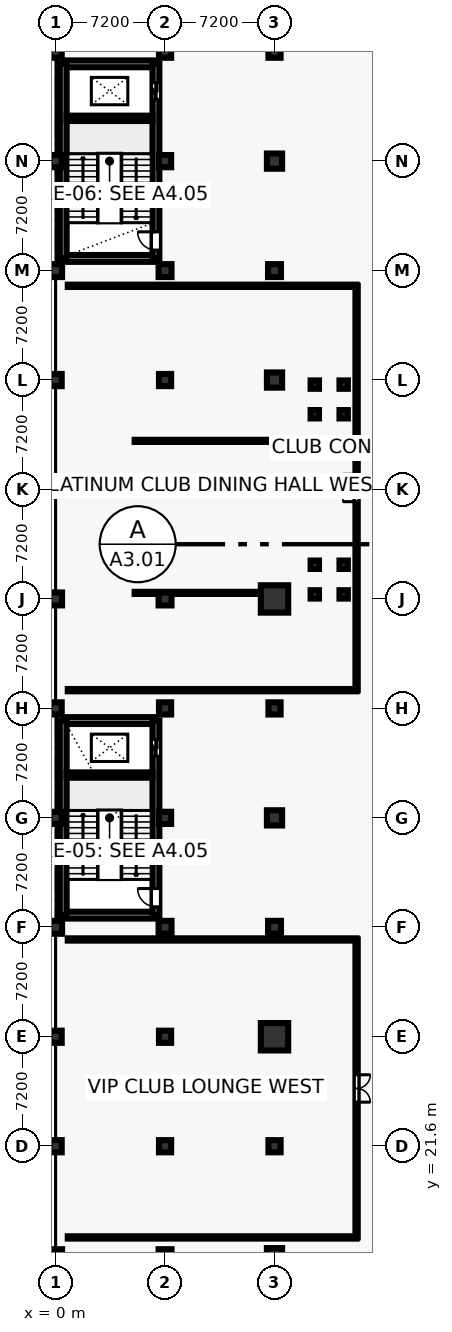
"""IFC4 building model, lengths in metres.
Left out: names, types, materials, properties, quantities, classifications, styles, units other than length and angle.
Written with IfcOpenShell. Run it as: python <this file> out.ifc"""

import sys

from ifc_helpers import new_model, si_unit, direction, frame, frame_2d, origin, origin_2d, place, context, subcontext, project, spatial, rectangle, circle, extrude, element, fill, save


model = new_model("IFC4")
c1 = context("Model", 3, precision=1e-05, world=origin(), true_north=direction((0.0, 1.0)))
c2 = subcontext(c1, "Body", "Model", "MODEL_VIEW")
j1 = project(units=[si_unit("LENGTHUNIT", "METRE"), si_unit("PLANEANGLEUNIT", "RADIAN")], contexts=[c1])
p1 = place(None, origin())
s1 = spatial("IfcSite", under=j1, at=p1, CompositionType="ELEMENT")
p2 = place(p1, origin())
s2 = spatial("IfcBuilding", under=s1, at=p2, CompositionType="ELEMENT")
p3 = place(p2, frame((0.0, 0.0, 5.4)))
s3 = spatial("IfcBuildingStorey", under=s2, at=p3, CompositionType="ELEMENT", Elevation=5.4)
p4 = place(p3, frame((0.0, 14.4, 0.0), z_axis=(0.0, 0.0, 1.0), x_axis=(1.0, 0.0, 0.0)))
e1 = element("IfcColumn", 1, at=p4, inside=s3, PredefinedType="COLUMN", context=c2, shape_type="SweptSolid", body=[
    extrude(rectangle(XDim=0.85, YDim=0.85, at=origin_2d()), origin(), (0.0, 0.0, 1.0), 4.2),
])
p5 = place(p3, frame((0.0, 21.6, 0.0), z_axis=(0.0, 0.0, 1.0), x_axis=(1.0, 0.0, 0.0)))
e2 = element("IfcColumn", 2, at=p5, inside=s3, PredefinedType="COLUMN", context=c2, shape_type="SweptSolid", body=[
    extrude(rectangle(XDim=0.8, YDim=0.8, at=origin_2d()), origin(), (0.0, 0.0, 1.0), 4.2),
])
p6 = place(p3, frame((0.0, 28.8, 0.0), z_axis=(0.0, 0.0, 1.0), x_axis=(1.0, 0.0, 0.0)))
e3 = element("IfcColumn", 3, at=p6, inside=s3, PredefinedType="COLUMN", context=c2, shape_type="SweptSolid", body=[
    extrude(circle(Radius=0.4, at=origin_2d()), origin(), (0.0, 0.0, 1.0), 4.2),
])
p7 = place(p3, frame((0.0, 36.0, 0.0), z_axis=(0.0, 0.0, 1.0), x_axis=(1.0, 0.0, 0.0)))
e4 = element("IfcColumn", 4, at=p7, inside=s3, PredefinedType="COLUMN", context=c2, shape_type="SweptSolid", body=[
    extrude(rectangle(XDim=0.85, YDim=0.85, at=origin_2d()), origin(), (0.0, 0.0, 1.0), 4.2),
])
p8 = place(p3, frame((0.0, 43.2, 0.0), z_axis=(0.0, 0.0, 1.0), x_axis=(1.0, 0.0, 0.0)))
e5 = element("IfcColumn", 5, at=p8, inside=s3, PredefinedType="COLUMN", context=c2, shape_type="SweptSolid", body=[
    extrude(rectangle(XDim=0.8, YDim=0.8, at=origin_2d()), origin(), (0.0, 0.0, 1.0), 4.2),
])
p9 = place(p3, frame((0.0, 50.4, 0.0), z_axis=(0.0, 0.0, 1.0), x_axis=(1.0, 0.0, 0.0)))
e6 = element("IfcColumn", 6, at=p9, inside=s3, PredefinedType="COLUMN", context=c2, shape_type="SweptSolid", body=[
    extrude(circle(Radius=0.4, at=origin_2d()), origin(), (0.0, 0.0, 1.0), 4.2),
])
p10 = place(p3, frame((0.0, 57.6, 0.0), z_axis=(0.0, 0.0, 1.0), x_axis=(1.0, 0.0, 0.0)))
e7 = element("IfcColumn", 7, at=p10, inside=s3, PredefinedType="COLUMN", context=c2, shape_type="SweptSolid", body=[
    extrude(rectangle(XDim=0.85, YDim=0.85, at=origin_2d()), origin(), (0.0, 0.0, 1.0), 4.2),
])
p11 = place(p3, frame((0.0, 64.8, 0.0), z_axis=(0.0, 0.0, 1.0), x_axis=(1.0, 0.0, 0.0)))
e8 = element("IfcColumn", 8, at=p11, inside=s3, PredefinedType="COLUMN", context=c2, shape_type="SweptSolid", body=[
    extrude(rectangle(XDim=0.8, YDim=0.8, at=origin_2d()), origin(), (0.0, 0.0, 1.0), 4.2),
])
p12 = place(p3, frame((0.0, 72.0, 0.0), z_axis=(0.0, 0.0, 1.0), x_axis=(1.0, 0.0, 0.0)))
e9 = element("IfcColumn", 9, at=p12, inside=s3, PredefinedType="COLUMN", context=c2, shape_type="SweptSolid", body=[
    extrude(circle(Radius=0.4, at=origin_2d()), origin(), (0.0, 0.0, 1.0), 4.2),
])
p13 = place(p3, frame((0.0, 79.2, 0.0), z_axis=(0.0, 0.0, 1.0), x_axis=(1.0, 0.0, 0.0)))
e10 = element("IfcColumn", 10, at=p13, inside=s3, PredefinedType="COLUMN", context=c2, shape_type="SweptSolid", body=[
    extrude(rectangle(XDim=0.85, YDim=0.85, at=origin_2d()), origin(), (0.0, 0.0, 1.0), 4.2),
])
p14 = place(p3, frame((0.0, 86.4, 0.0), z_axis=(0.0, 0.0, 1.0), x_axis=(1.0, 0.0, 0.0)))
e11 = element("IfcColumn", 11, at=p14, inside=s3, PredefinedType="COLUMN", context=c2, shape_type="SweptSolid", body=[
    extrude(rectangle(XDim=0.8, YDim=0.8, at=origin_2d()), origin(), (0.0, 0.0, 1.0), 4.2),
])
p15 = place(p3, frame((0.0, 93.6, 0.0), z_axis=(0.0, 0.0, 1.0), x_axis=(1.0, 0.0, 0.0)))
e12 = element("IfcColumn", 12, at=p15, inside=s3, PredefinedType="COLUMN", context=c2, shape_type="SweptSolid", body=[
    extrude(circle(Radius=0.4, at=origin_2d()), origin(), (0.0, 0.0, 1.0), 4.2),
])
p16 = place(p3, frame((7.2, 14.4, 0.0), z_axis=(0.0, 0.0, 1.0), x_axis=(1.0, 0.0, 0.0)))
e13 = element("IfcColumn", 13, at=p16, inside=s3, PredefinedType="COLUMN", context=c2, shape_type="SweptSolid", body=[
    extrude(rectangle(XDim=0.85, YDim=0.85, at=origin_2d()), origin(), (0.0, 0.0, 1.0), 4.2),
])
p17 = place(p3, frame((7.2, 21.6, 0.0), z_axis=(0.0, 0.0, 1.0), x_axis=(1.0, 0.0, 0.0)))
e14 = element("IfcColumn", 14, at=p17, inside=s3, PredefinedType="COLUMN", context=c2, shape_type="SweptSolid", body=[
    extrude(rectangle(XDim=0.8, YDim=0.8, at=origin_2d()), origin(), (0.0, 0.0, 1.0), 4.2),
])
p18 = place(p3, frame((7.2, 28.8, 0.0), z_axis=(0.0, 0.0, 1.0), x_axis=(1.0, 0.0, 0.0)))
e15 = element("IfcColumn", 15, at=p18, inside=s3, PredefinedType="COLUMN", context=c2, shape_type="SweptSolid", body=[
    extrude(circle(Radius=0.4, at=origin_2d()), origin(), (0.0, 0.0, 1.0), 4.2),
])
p19 = place(p3, frame((7.2, 36.0, 0.0), z_axis=(0.0, 0.0, 1.0), x_axis=(1.0, 0.0, 0.0)))
e16 = element("IfcColumn", 16, at=p19, inside=s3, PredefinedType="COLUMN", context=c2, shape_type="SweptSolid", body=[
    extrude(rectangle(XDim=0.85, YDim=0.85, at=origin_2d()), origin(), (0.0, 0.0, 1.0), 4.2),
])
p20 = place(p3, frame((7.2, 43.2, 0.0), z_axis=(0.0, 0.0, 1.0), x_axis=(1.0, 0.0, 0.0)))
e17 = element("IfcColumn", 17, at=p20, inside=s3, PredefinedType="COLUMN", context=c2, shape_type="SweptSolid", body=[
    extrude(rectangle(XDim=0.8, YDim=0.8, at=origin_2d()), origin(), (0.0, 0.0, 1.0), 4.2),
])
p21 = place(p3, frame((7.2, 50.4, 0.0), z_axis=(0.0, 0.0, 1.0), x_axis=(1.0, 0.0, 0.0)))
e18 = element("IfcColumn", 18, at=p21, inside=s3, PredefinedType="COLUMN", context=c2, shape_type="SweptSolid", body=[
    extrude(circle(Radius=0.4, at=origin_2d()), origin(), (0.0, 0.0, 1.0), 4.2),
])
p22 = place(p3, frame((7.2, 57.6, 0.0), z_axis=(0.0, 0.0, 1.0), x_axis=(1.0, 0.0, 0.0)))
e19 = element("IfcColumn", 19, at=p22, inside=s3, PredefinedType="COLUMN", context=c2, shape_type="SweptSolid", body=[
    extrude(rectangle(XDim=0.85, YDim=0.85, at=origin_2d()), origin(), (0.0, 0.0, 1.0), 4.2),
])
p23 = place(p3, frame((7.2, 64.8, 0.0), z_axis=(0.0, 0.0, 1.0), x_axis=(1.0, 0.0, 0.0)))
e20 = element("IfcColumn", 20, at=p23, inside=s3, PredefinedType="COLUMN", context=c2, shape_type="SweptSolid", body=[
    extrude(rectangle(XDim=0.8, YDim=0.8, at=origin_2d()), origin(), (0.0, 0.0, 1.0), 4.2),
])
p24 = place(p3, frame((7.2, 72.0, 0.0), z_axis=(0.0, 0.0, 1.0), x_axis=(1.0, 0.0, 0.0)))
e21 = element("IfcColumn", 21, at=p24, inside=s3, PredefinedType="COLUMN", context=c2, shape_type="SweptSolid", body=[
    extrude(circle(Radius=0.4, at=origin_2d()), origin(), (0.0, 0.0, 1.0), 4.2),
])
p25 = place(p3, frame((7.2, 79.2, 0.0), z_axis=(0.0, 0.0, 1.0), x_axis=(1.0, 0.0, 0.0)))
e22 = element("IfcColumn", 22, at=p25, inside=s3, PredefinedType="COLUMN", context=c2, shape_type="SweptSolid", body=[
    extrude(rectangle(XDim=0.85, YDim=0.85, at=origin_2d()), origin(), (0.0, 0.0, 1.0), 4.2),
])
p26 = place(p3, frame((7.2, 86.4, 0.0), z_axis=(0.0, 0.0, 1.0), x_axis=(1.0, 0.0, 0.0)))
e23 = element("IfcColumn", 23, at=p26, inside=s3, PredefinedType="COLUMN", context=c2, shape_type="SweptSolid", body=[
    extrude(rectangle(XDim=0.8, YDim=0.8, at=origin_2d()), origin(), (0.0, 0.0, 1.0), 4.2),
])
p27 = place(p3, frame((7.2, 93.6, 0.0), z_axis=(0.0, 0.0, 1.0), x_axis=(1.0, 0.0, 0.0)))
e24 = element("IfcColumn", 24, at=p27, inside=s3, PredefinedType="COLUMN", context=c2, shape_type="SweptSolid", body=[
    extrude(circle(Radius=0.4, at=origin_2d()), origin(), (0.0, 0.0, 1.0), 4.2),
])
p28 = place(p3, frame((14.4, 14.4, 0.0), z_axis=(0.0, 0.0, 1.0), x_axis=(1.0, 0.0, 0.0)))
e25 = element("IfcColumn", 25, at=p28, inside=s3, PredefinedType="COLUMN", context=c2, shape_type="SweptSolid", body=[
    extrude(circle(Radius=0.5, at=origin_2d()), origin(), (0.0, 0.0, 1.0), 4.2),
])
p29 = place(p3, frame((14.4, 21.6, 0.0), z_axis=(0.0, 0.0, 1.0), x_axis=(1.0, 0.0, 0.0)))
e26 = element("IfcColumn", 26, at=p29, inside=s3, PredefinedType="COLUMN", context=c2, shape_type="SweptSolid", body=[
    extrude(rectangle(XDim=0.8, YDim=0.8, at=origin_2d()), origin(), (0.0, 0.0, 1.0), 4.2),
])
p30 = place(p3, frame((14.4, 28.8, 0.0), z_axis=(0.0, 0.0, 1.0), x_axis=(1.0, 0.0, 0.0)))
e27 = element("IfcColumn", 27, at=p30, inside=s3, PredefinedType="COLUMN", context=c2, shape_type="SweptSolid", body=[
    extrude(circle(Radius=0.9, at=origin_2d()), origin(), (0.0, 0.0, 1.0), 4.2),
])
p31 = place(p3, frame((14.4, 36.0, 0.0), z_axis=(0.0, 0.0, 1.0), x_axis=(1.0, 0.0, 0.0)))
e28 = element("IfcColumn", 28, at=p31, inside=s3, PredefinedType="COLUMN", context=c2, shape_type="SweptSolid", body=[
    extrude(rectangle(XDim=0.85, YDim=0.85, at=origin_2d()), origin(), (0.0, 0.0, 1.0), 4.2),
])
p32 = place(p3, frame((14.4, 43.2, 0.0), z_axis=(0.0, 0.0, 1.0), x_axis=(1.0, 0.0, 0.0)))
e29 = element("IfcColumn", 29, at=p32, inside=s3, PredefinedType="COLUMN", context=c2, shape_type="SweptSolid", body=[
    extrude(circle(Radius=0.5, at=origin_2d()), origin(), (0.0, 0.0, 1.0), 4.2),
])
p33 = place(p3, frame((14.4, 50.4, 0.0), z_axis=(0.0, 0.0, 1.0), x_axis=(1.0, 0.0, 0.0)))
e30 = element("IfcColumn", 30, at=p33, inside=s3, PredefinedType="COLUMN", context=c2, shape_type="SweptSolid", body=[
    extrude(circle(Radius=0.4, at=origin_2d()), origin(), (0.0, 0.0, 1.0), 4.2),
])
p34 = place(p3, frame((14.4, 57.6, 0.0), z_axis=(0.0, 0.0, 1.0), x_axis=(1.0, 0.0, 0.0)))
e31 = element("IfcColumn", 31, at=p34, inside=s3, PredefinedType="COLUMN", context=c2, shape_type="SweptSolid", body=[
    extrude(circle(Radius=0.9, at=origin_2d()), origin(), (0.0, 0.0, 1.0), 4.2),
])
p35 = place(p3, frame((14.4, 64.8, 0.0), z_axis=(0.0, 0.0, 1.0), x_axis=(1.0, 0.0, 0.0)))
e32 = element("IfcColumn", 32, at=p35, inside=s3, PredefinedType="COLUMN", context=c2, shape_type="SweptSolid", body=[
    extrude(rectangle(XDim=0.8, YDim=0.8, at=origin_2d()), origin(), (0.0, 0.0, 1.0), 4.2),
])
p36 = place(p3, frame((14.4, 72.0, 0.0), z_axis=(0.0, 0.0, 1.0), x_axis=(1.0, 0.0, 0.0)))
e33 = element("IfcColumn", 33, at=p36, inside=s3, PredefinedType="COLUMN", context=c2, shape_type="SweptSolid", body=[
    extrude(circle(Radius=0.5, at=origin_2d()), origin(), (0.0, 0.0, 1.0), 4.2),
])
p37 = place(p3, frame((14.4, 79.2, 0.0), z_axis=(0.0, 0.0, 1.0), x_axis=(1.0, 0.0, 0.0)))
e34 = element("IfcColumn", 34, at=p37, inside=s3, PredefinedType="COLUMN", context=c2, shape_type="SweptSolid", body=[
    extrude(rectangle(XDim=0.85, YDim=0.85, at=origin_2d()), origin(), (0.0, 0.0, 1.0), 4.2),
])
p38 = place(p3, frame((14.4, 86.4, 0.0), z_axis=(0.0, 0.0, 1.0), x_axis=(1.0, 0.0, 0.0)))
e35 = element("IfcColumn", 35, at=p38, inside=s3, PredefinedType="COLUMN", context=c2, shape_type="SweptSolid", body=[
    extrude(circle(Radius=0.5, at=origin_2d()), origin(), (0.0, 0.0, 1.0), 4.2),
])
p39 = place(p3, frame((14.4, 93.6, 0.0), z_axis=(0.0, 0.0, 1.0), x_axis=(1.0, 0.0, 0.0)))
e36 = element("IfcColumn", 36, at=p39, inside=s3, PredefinedType="COLUMN", context=c2, shape_type="SweptSolid", body=[
    extrude(circle(Radius=0.4, at=origin_2d()), origin(), (0.0, 0.0, 1.0), 4.2),
])
for number, where, z_axis, x_axis in (
    (37, (0.5, 36.8, 0.0), (0.0, 0.0, 1.0), (1.0, 0.0, 0.0)),
    (38, (0.5, 49.6, 0.0), (0.0, 0.0, 1.0), (1.0, 0.0, 0.0)),
):
    element("IfcWall", number, at=place(p3, frame(where, z_axis=z_axis, x_axis=x_axis)), inside=s3, PredefinedType="SHEAR", context=c2, shape_type="SweptSolid", body=[
        extrude(rectangle(XDim=6.1, YDim=0.45, at=frame_2d((3.05, 0.0))), origin(), (0.0, 0.0, 1.0), 3.92),
    ])
p40 = place(p3, frame((0.5, 36.8, 0.0), z_axis=(0.0, 0.0, 1.0), x_axis=(0.0, 1.0, 0.0)))
e39 = element("IfcWall", 39, at=p40, inside=s3, PredefinedType="SHEAR", context=c2, shape_type="SweptSolid", body=[
    extrude(rectangle(XDim=12.8, YDim=0.45, at=frame_2d((6.4, 0.0))), origin(), (0.0, 0.0, 1.0), 3.92),
])
p41 = place(p3, frame((6.6, 36.8, 0.0), z_axis=(0.0, 0.0, 1.0), x_axis=(0.0, 1.0, 0.0)))
e40 = element("IfcWall", 40, at=p41, inside=s3, PredefinedType="SHEAR", context=c2, shape_type="SweptSolid", body=[
    extrude(rectangle(XDim=12.8, YDim=0.45, at=frame_2d((6.4, 0.0))), origin(), (0.0, 0.0, 1.0), 3.92),
])
p42 = place(p41, frame((0.55, 0.0, 0.0)))
e41 = element("IfcOpeningElement", 41, at=p42, cuts=e40, PredefinedType="OPENING", context=c2, shape_type="SweptSolid", body=[
    extrude(rectangle(XDim=1.2, YDim=2.25, at=frame_2d((0.6, 1.125))), frame((0.0, 0.235, 0.0), z_axis=(0.0, -1.0, 0.0), x_axis=(1.0, 0.0, 0.0)), (0.0, 0.0, 1.0), 0.47),
])
p43 = place(p41, frame((10.458, 0.0, 0.0)))
e42 = element("IfcOpeningElement", 42, at=p43, cuts=e40, PredefinedType="OPENING", context=c2, shape_type="SweptSolid", body=[
    extrude(rectangle(XDim=1.1, YDim=2.2, at=frame_2d((0.55, 1.1))), frame((0.0, 0.235, 0.0), z_axis=(0.0, -1.0, 0.0), x_axis=(1.0, 0.0, 0.0)), (0.0, 0.0, 1.0), 0.47),
])
p44 = place(p3, frame((0.725, 46.016, 0.0), z_axis=(0.0, 0.0, 1.0), x_axis=(1.0, 0.0, 0.0)))
e43 = element("IfcWall", 43, at=p44, inside=s3, PredefinedType="SHEAR", context=c2, shape_type="SweptSolid", body=[
    extrude(rectangle(XDim=5.65, YDim=0.35, at=frame_2d((2.825, 0.0))), origin(), (0.0, 0.0, 1.0), 3.92),
])
for number, where, z_axis, x_axis in (
    (44, (0.5, 80.0, 0.0), (0.0, 0.0, 1.0), (1.0, 0.0, 0.0)),
    (45, (0.5, 92.8, 0.0), (0.0, 0.0, 1.0), (1.0, 0.0, 0.0)),
):
    element("IfcWall", number, at=place(p3, frame(where, z_axis=z_axis, x_axis=x_axis)), inside=s3, PredefinedType="SHEAR", context=c2, shape_type="SweptSolid", body=[
        extrude(rectangle(XDim=6.1, YDim=0.45, at=frame_2d((3.05, 0.0))), origin(), (0.0, 0.0, 1.0), 3.92),
    ])
p45 = place(p3, frame((0.5, 80.0, 0.0), z_axis=(0.0, 0.0, 1.0), x_axis=(0.0, 1.0, 0.0)))
e46 = element("IfcWall", 46, at=p45, inside=s3, PredefinedType="SHEAR", context=c2, shape_type="SweptSolid", body=[
    extrude(rectangle(XDim=12.8, YDim=0.45, at=frame_2d((6.4, 0.0))), origin(), (0.0, 0.0, 1.0), 3.92),
])
p46 = place(p3, frame((6.6, 80.0, 0.0), z_axis=(0.0, 0.0, 1.0), x_axis=(0.0, 1.0, 0.0)))
e47 = element("IfcWall", 47, at=p46, inside=s3, PredefinedType="SHEAR", context=c2, shape_type="SweptSolid", body=[
    extrude(rectangle(XDim=12.8, YDim=0.45, at=frame_2d((6.4, 0.0))), origin(), (0.0, 0.0, 1.0), 3.92),
])
p47 = place(p46, frame((0.55, 0.0, 0.0)))
e48 = element("IfcOpeningElement", 48, at=p47, cuts=e47, PredefinedType="OPENING", context=c2, shape_type="SweptSolid", body=[
    extrude(rectangle(XDim=1.2, YDim=2.25, at=frame_2d((0.6, 1.125))), frame((0.0, 0.235, 0.0), z_axis=(0.0, -1.0, 0.0), x_axis=(1.0, 0.0, 0.0)), (0.0, 0.0, 1.0), 0.47),
])
p48 = place(p46, frame((10.458, 0.0, 0.0)))
e49 = element("IfcOpeningElement", 49, at=p48, cuts=e47, PredefinedType="OPENING", context=c2, shape_type="SweptSolid", body=[
    extrude(rectangle(XDim=1.1, YDim=2.2, at=frame_2d((0.55, 1.1))), frame((0.0, 0.235, 0.0), z_axis=(0.0, -1.0, 0.0), x_axis=(1.0, 0.0, 0.0)), (0.0, 0.0, 1.0), 0.47),
])
p49 = place(p3, frame((0.725, 89.216, 0.0), z_axis=(0.0, 0.0, 1.0), x_axis=(1.0, 0.0, 0.0)))
e50 = element("IfcWall", 50, at=p49, inside=s3, PredefinedType="SHEAR", context=c2, shape_type="SweptSolid", body=[
    extrude(rectangle(XDim=5.65, YDim=0.35, at=frame_2d((2.825, 0.0))), origin(), (0.0, 0.0, 1.0), 3.92),
])
for number, where, z_axis, x_axis in (
    (51, (17.05, 57.9, 0.0), (0.0, 0.0, 1.0), (1.0, 0.0, 0.0)),
    (52, (18.95, 57.9, 0.0), (0.0, 0.0, 1.0), (1.0, 0.0, 0.0)),
    (53, (17.05, 59.85, 0.0), (0.0, 0.0, 1.0), (1.0, 0.0, 0.0)),
    (54, (18.95, 59.85, 0.0), (0.0, 0.0, 1.0), (1.0, 0.0, 0.0)),
    (55, (17.05, 69.75, 0.0), (0.0, 0.0, 1.0), (1.0, 0.0, 0.0)),
    (56, (18.95, 69.75, 0.0), (0.0, 0.0, 1.0), (1.0, 0.0, 0.0)),
    (57, (17.05, 71.7, 0.0), (0.0, 0.0, 1.0), (1.0, 0.0, 0.0)),
    (58, (18.95, 71.7, 0.0), (0.0, 0.0, 1.0), (1.0, 0.0, 0.0)),
):
    element("IfcColumn", number, at=place(p3, frame(where, z_axis=z_axis, x_axis=x_axis)), inside=s3, PredefinedType="COLUMN", context=c2, shape_type="SweptSolid", body=[
        extrude(rectangle(XDim=0.55, YDim=0.55, at=origin_2d()), origin(), (0.0, 0.0, 1.0), 4.2),
    ])
p50 = place(p3, frame((0.8, 15.6, 0.0), z_axis=(0.0, 0.0, 1.0), x_axis=(1.0, 0.0, 0.0)))
e59 = element("IfcWall", 59, at=p50, inside=s3, PredefinedType="PARTITIONING", context=c2, shape_type="SweptSolid", body=[
    extrude(rectangle(XDim=19.0, YDim=0.15, at=frame_2d((9.5, 0.0))), origin(), (0.0, 0.0, 1.0), 2.98),
])
p51 = place(p3, frame((19.8, 15.6, 0.0), z_axis=(0.0, 0.0, 1.0), x_axis=(0.0, 1.0, 0.0)))
e60 = element("IfcWall", 60, at=p51, inside=s3, PredefinedType="PARTITIONING", context=c2, shape_type="SweptSolid", body=[
    extrude(rectangle(XDim=19.6, YDim=0.15, at=frame_2d((9.8, 0.0))), origin(), (0.0, 0.0, 1.0), 2.98),
])
p52 = place(p51, frame((8.9, 0.0, 0.0)))
e61 = element("IfcOpeningElement", 61, at=p52, cuts=e60, PredefinedType="OPENING", context=c2, shape_type="SweptSolid", body=[
    extrude(rectangle(XDim=1.8, YDim=2.3, at=frame_2d((0.9, 1.15))), frame((0.0, 0.085, 0.0), z_axis=(0.0, -1.0, 0.0), x_axis=(1.0, 0.0, 0.0)), (0.0, 0.0, 1.0), 0.17),
])
for number, where, z_axis, x_axis in (
    (62, (19.8, 35.2, 0.0), (0.0, 0.0, 1.0), (-1.0, 0.0, 0.0)),
    (63, (0.8, 51.6, 0.0), (0.0, 0.0, 1.0), (1.0, 0.0, 0.0)),
):
    element("IfcWall", number, at=place(p3, frame(where, z_axis=z_axis, x_axis=x_axis)), inside=s3, PredefinedType="PARTITIONING", context=c2, shape_type="SweptSolid", body=[
        extrude(rectangle(XDim=19.0, YDim=0.15, at=frame_2d((9.5, 0.0))), origin(), (0.0, 0.0, 1.0), 2.98),
    ])
p53 = place(p3, frame((19.8, 51.6, 0.0), z_axis=(0.0, 0.0, 1.0), x_axis=(0.0, 1.0, 0.0)))
e64 = element("IfcWall", 64, at=p53, inside=s3, PredefinedType="PARTITIONING", context=c2, shape_type="SweptSolid", body=[
    extrude(rectangle(XDim=26.6, YDim=0.15, at=frame_2d((13.3, 0.0))), origin(), (0.0, 0.0, 1.0), 2.98),
])
p54 = place(p53, frame((12.4, 0.0, 0.0)))
e65 = element("IfcOpeningElement", 65, at=p54, cuts=e64, PredefinedType="OPENING", context=c2, shape_type="SweptSolid", body=[
    extrude(rectangle(XDim=1.8, YDim=2.3, at=frame_2d((0.9, 1.15))), frame((0.0, 0.085, 0.0), z_axis=(0.0, -1.0, 0.0), x_axis=(1.0, 0.0, 0.0)), (0.0, 0.0, 1.0), 0.17),
])
p55 = place(p3, frame((19.8, 78.2, 0.0), z_axis=(0.0, 0.0, 1.0), x_axis=(-1.0, 0.0, 0.0)))
e66 = element("IfcWall", 66, at=p55, inside=s3, PredefinedType="PARTITIONING", context=c2, shape_type="SweptSolid", body=[
    extrude(rectangle(XDim=19.0, YDim=0.15, at=frame_2d((9.5, 0.0))), origin(), (0.0, 0.0, 1.0), 2.98),
])
for number, where, z_axis, x_axis in (
    (67, (5.2, 58.0, 0.0), (0.0, 0.0, 1.0), (1.0, 0.0, 0.0)),
    (68, (5.2, 68.0, 0.0), (0.0, 0.0, 1.0), (1.0, 0.0, 0.0)),
):
    element("IfcWall", number, at=place(p3, frame(where, z_axis=z_axis, x_axis=x_axis)), inside=s3, PredefinedType="MOVABLE", context=c2, shape_type="SweptSolid", body=[
        extrude(rectangle(XDim=8.8, YDim=0.14, at=frame_2d((4.4, 0.0))), origin(), (0.0, 0.0, 1.0), 2.97),
    ])
p56 = place(p42, origin())
e69 = element("IfcDoor", 69, at=p56, inside=s3, OperationType="SINGLE_SWING_RIGHT", PredefinedType="DOOR", context=c2, shape_type="SweptSolid", body=[
    extrude(rectangle(XDim=1.2, YDim=2.25, at=frame_2d((0.6, 1.125))), frame((0.0, 0.025, 0.0), z_axis=(0.0, -1.0, 0.0), x_axis=(1.0, 0.0, 0.0)), (0.0, 0.0, 1.0), 0.05),
])
fill(e41, e69)
p57 = place(p43, origin())
e70 = element("IfcDoor", 70, at=p57, inside=s3, OperationType="SLIDING_TO_LEFT", PredefinedType="DOOR", context=c2, shape_type="SweptSolid", body=[
    extrude(rectangle(XDim=1.1, YDim=2.2, at=frame_2d((0.55, 1.1))), frame((0.0, 0.025, 0.0), z_axis=(0.0, -1.0, 0.0), x_axis=(1.0, 0.0, 0.0)), (0.0, 0.0, 1.0), 0.05),
])
fill(e42, e70)
p58 = place(p47, origin())
e71 = element("IfcDoor", 71, at=p58, inside=s3, OperationType="SINGLE_SWING_RIGHT", PredefinedType="DOOR", context=c2, shape_type="SweptSolid", body=[
    extrude(rectangle(XDim=1.2, YDim=2.25, at=frame_2d((0.6, 1.125))), frame((0.0, 0.025, 0.0), z_axis=(0.0, -1.0, 0.0), x_axis=(1.0, 0.0, 0.0)), (0.0, 0.0, 1.0), 0.05),
])
fill(e48, e71)
p59 = place(p48, origin())
e72 = element("IfcDoor", 72, at=p59, inside=s3, OperationType="SLIDING_TO_LEFT", PredefinedType="DOOR", context=c2, shape_type="SweptSolid", body=[
    extrude(rectangle(XDim=1.1, YDim=2.2, at=frame_2d((0.55, 1.1))), frame((0.0, 0.025, 0.0), z_axis=(0.0, -1.0, 0.0), x_axis=(1.0, 0.0, 0.0)), (0.0, 0.0, 1.0), 0.05),
])
fill(e49, e72)
p60 = place(p52, frame((1.8, 0.0, 0.0), z_axis=(0.0, 0.0, 1.0), x_axis=(-1.0, 0.0, 0.0)))
e73 = element("IfcDoor", 73, at=p60, inside=s3, OperationType="DOUBLE_DOOR_SINGLE_SWING", PredefinedType="DOOR", context=c2, shape_type="SweptSolid", body=[
    extrude(rectangle(XDim=1.8, YDim=2.3, at=frame_2d((0.9, 1.15))), frame((0.0, 0.025, 0.0), z_axis=(0.0, -1.0, 0.0), x_axis=(1.0, 0.0, 0.0)), (0.0, 0.0, 1.0), 0.05),
])
fill(e61, e73)
p61 = place(p54, origin())
e74 = element("IfcDoor", 74, at=p61, inside=s3, OperationType="DOUBLE_DOOR_SINGLE_SWING", PredefinedType="DOOR", context=c2, shape_type="SweptSolid", body=[
    extrude(rectangle(XDim=1.8, YDim=2.3, at=frame_2d((0.9, 1.15))), frame((0.0, 0.025, 0.0), z_axis=(0.0, -1.0, 0.0), x_axis=(1.0, 0.0, 0.0)), (0.0, 0.0, 1.0), 0.05),
])
fill(e65, e74)
save(model, sys.argv[1])
